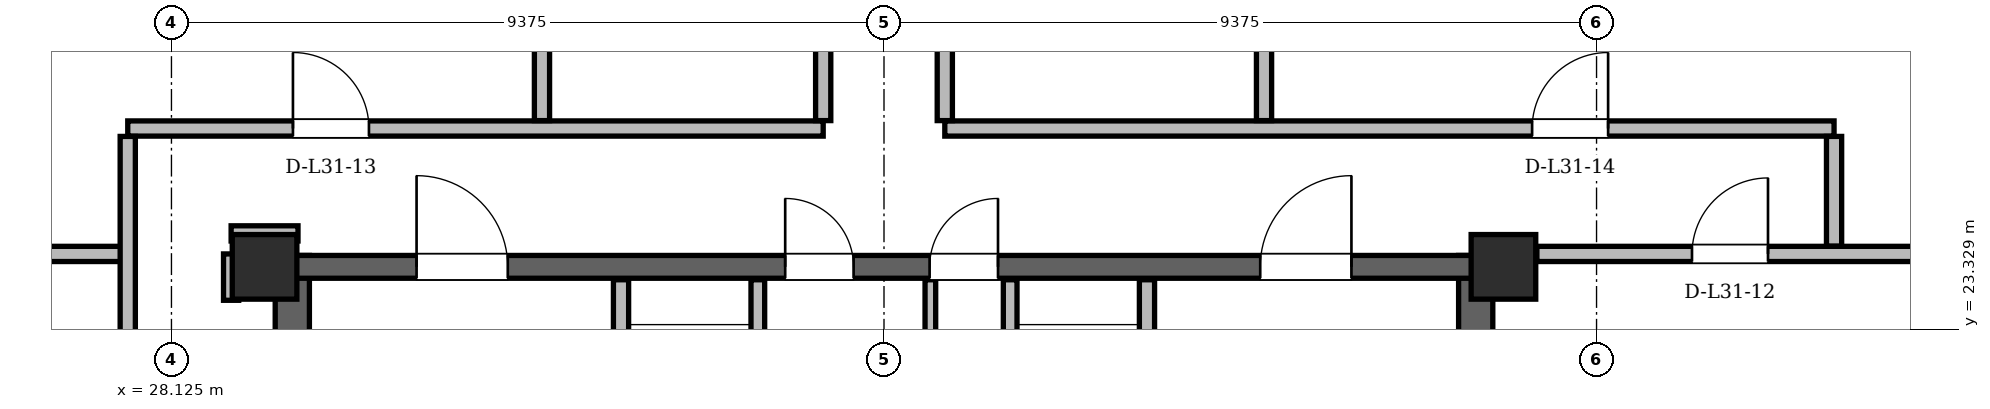
"""IFC4 building model, lengths in metres.
Left out: names, types, materials, properties, quantities, classifications, styles, units other than length and angle.
Written with IfcOpenShell. Run it as: python <this file> out.ifc"""

import sys

from ifc_helpers import new_model, si_unit, direction, frame, frame_2d, origin, origin_2d, place, context, subcontext, project, spatial, rectangle, hollow_rectangle, extrude, element, fill, save


model = new_model("IFC4")
c1 = context("Model", 3, precision=1e-05, world=origin(), true_north=direction((0.0, 1.0)))
c2 = subcontext(c1, "Body", "Model", "MODEL_VIEW")
j1 = project(units=[si_unit("LENGTHUNIT", "METRE"), si_unit("PLANEANGLEUNIT", "RADIAN")], contexts=[c1])
p1 = place(None, origin())
s1 = spatial("IfcSite", under=j1, at=p1, CompositionType="ELEMENT")
p2 = place(p1, origin())
s2 = spatial("IfcBuilding", under=s1, at=p2, CompositionType="ELEMENT")
p3 = place(p2, frame((0.0, 0.0, 119.4)))
s3 = spatial("IfcBuildingStorey", under=s2, at=p3, CompositionType="ELEMENT", Elevation=119.4)
for number, where, z_axis, x_axis in (
    (1, (45.65, 24.15, 0.0), (0.0, 0.0, 1.0), (1.0, 0.0, 0.0)),
    (2, (29.35, 24.15, 0.0), (0.0, 0.0, 1.0), (1.0, 0.0, 0.0)),
):
    element("IfcColumn", number, at=place(p3, frame(where, z_axis=z_axis, x_axis=x_axis)), inside=s3, PredefinedType="COLUMN", context=c2, shape_type="SweptSolid", body=[
        extrude(hollow_rectangle(XDim=0.85, YDim=0.85, WallThickness=0.07, at=origin_2d()), origin(), (0.0, 0.0, 1.0), 3.6),
    ])
for number, where, z_axis, x_axis in (
    (3, (29.715, 11.0, 0.0), (0.0, 0.0, 1.0), (0.0, 1.0, 0.0)),
    (4, (45.285, 11.0, 0.0), (0.0, 0.0, 1.0), (0.0, 1.0, 0.0)),
):
    element("IfcWall", number, at=place(p3, frame(where, z_axis=z_axis, x_axis=x_axis)), inside=s3, PredefinedType="SHEAR", context=c2, shape_type="SweptSolid", body=[
        extrude(rectangle(XDim=13.3, YDim=0.45, at=frame_2d((6.65, 0.0))), origin(), (0.0, 0.0, 1.0), 3.36),
    ])
p4 = place(p3, frame((29.65, 24.15, 0.0), z_axis=(0.0, 0.0, 1.0), x_axis=(1.0, 0.0, 0.0)))
e5 = element("IfcWall", 5, at=p4, inside=s3, PredefinedType="SHEAR", context=c2, shape_type="SweptSolid", body=[
    extrude(rectangle(XDim=15.7, YDim=0.3, at=frame_2d((7.85, 0.0))), origin(), (0.0, 0.0, 1.0), 3.36),
])
p5 = place(p4, frame((1.7, 0.0, 0.0)))
e6 = element("IfcOpeningElement", 6, at=p5, cuts=e5, PredefinedType="OPENING", context=c2, shape_type="SweptSolid", body=[
    extrude(rectangle(XDim=1.2, YDim=2.2, at=frame_2d((0.6, 1.1))), frame((0.0, 0.15, 0.0), z_axis=(0.0, -1.0, 0.0), x_axis=(1.0, 0.0, 0.0)), (0.0, 0.0, 1.0), 0.3),
])
p6 = place(p4, frame((12.8, 0.0, 0.0)))
e7 = element("IfcOpeningElement", 7, at=p6, cuts=e5, PredefinedType="OPENING", context=c2, shape_type="SweptSolid", body=[
    extrude(rectangle(XDim=1.2, YDim=2.2, at=frame_2d((0.6, 1.1))), frame((0.0, 0.15, 0.0), z_axis=(0.0, -1.0, 0.0), x_axis=(1.0, 0.0, 0.0)), (0.0, 0.0, 1.0), 0.3),
])
p7 = place(p4, frame((6.55, 0.0, 0.0)))
e8 = element("IfcOpeningElement", 8, at=p7, cuts=e5, PredefinedType="OPENING", context=c2, shape_type="SweptSolid", body=[
    extrude(rectangle(XDim=0.9, YDim=2.05, at=frame_2d((0.45, 1.025))), frame((0.0, 0.15, 0.0), z_axis=(0.0, -1.0, 0.0), x_axis=(1.0, 0.0, 0.0)), (0.0, 0.0, 1.0), 0.3),
])
p8 = place(p4, frame((8.45, 0.0, 0.0)))
e9 = element("IfcOpeningElement", 9, at=p8, cuts=e5, PredefinedType="OPENING", context=c2, shape_type="SweptSolid", body=[
    extrude(rectangle(XDim=0.9, YDim=2.05, at=frame_2d((0.45, 1.025))), frame((0.0, 0.15, 0.0), z_axis=(0.0, -1.0, 0.0), x_axis=(1.0, 0.0, 0.0)), (0.0, 0.0, 1.0), 0.3),
])
p9 = place(p3, frame((60.417, 13.181, 0.0), z_axis=(0.0, 0.0, 1.0), x_axis=(-0.499998569178, 0.866026229868, 0.0)))
e10 = element("IfcWall", 10, at=p9, inside=s3, PredefinedType="SOLIDWALL", context=c2, shape_type="SweptSolid", body=[
    extrude(rectangle(XDim=34.901, YDim=0.34, at=frame_2d((17.451, 0.0))), origin(), (0.0, 0.0, 1.0), 2.578),
])
p10 = place(p9, frame((6.369, 0.0, 0.0)))
e11 = element("IfcOpeningElement", 11, at=p10, cuts=e10, PredefinedType="OPENING", context=c2, shape_type="SweptSolid", body=[
    extrude(rectangle(XDim=1.5, YDim=2.2, at=frame_2d((0.75, 1.1))), frame((0.0, 0.17, 0.0), z_axis=(0.0, -1.0, 0.0), x_axis=(1.0, 0.0, 0.0)), (0.0, 0.0, 1.0), 0.34),
])
p11 = place(p9, frame((25.367, 0.0, 0.0)))
e12 = element("IfcOpeningElement", 12, at=p11, cuts=e10, PredefinedType="OPENING", context=c2, shape_type="SweptSolid", body=[
    extrude(rectangle(XDim=1.5, YDim=2.2, at=frame_2d((0.75, 1.1))), frame((0.0, 0.17, 0.0), z_axis=(0.0, -1.0, 0.0), x_axis=(1.0, 0.0, 0.0)), (0.0, 0.0, 1.0), 0.34),
])
p12 = place(p9, frame((3.309, 0.0, 0.85)))
e13 = element("IfcOpeningElement", 13, at=p12, cuts=e10, PredefinedType="OPENING", context=c2, shape_type="SweptSolid", body=[
    extrude(rectangle(XDim=1.2, YDim=1.48, at=frame_2d((0.6, 0.74))), frame((0.0, 0.17, 0.0), z_axis=(0.0, -1.0, 0.0), x_axis=(1.0, 0.0, 0.0)), (0.0, 0.0, 1.0), 0.34),
])
p13 = place(p9, frame((11.346, 0.0, 0.85)))
e14 = element("IfcOpeningElement", 14, at=p13, cuts=e10, PredefinedType="OPENING", context=c2, shape_type="SweptSolid", body=[
    extrude(rectangle(XDim=1.2, YDim=1.48, at=frame_2d((0.6, 0.74))), frame((0.0, 0.17, 0.0), z_axis=(0.0, -1.0, 0.0), x_axis=(1.0, 0.0, 0.0)), (0.0, 0.0, 1.0), 0.34),
])
p14 = place(p9, frame((32.719, 0.0, 0.85)))
e15 = element("IfcOpeningElement", 15, at=p14, cuts=e10, PredefinedType="OPENING", context=c2, shape_type="SweptSolid", body=[
    extrude(rectangle(XDim=1.2, YDim=1.48, at=frame_2d((0.6, 0.74))), frame((0.0, 0.17, 0.0), z_axis=(0.0, -1.0, 0.0), x_axis=(1.0, 0.0, 0.0)), (0.0, 0.0, 1.0), 0.34),
])
p15 = place(p9, frame((14.549, 0.0, 0.85)))
e16 = element("IfcOpeningElement", 16, at=p15, cuts=e10, PredefinedType="OPENING", context=c2, shape_type="SweptSolid", body=[
    extrude(rectangle(XDim=2.5, YDim=1.618, at=frame_2d((1.25, 0.809))), frame((0.0, 0.17, 0.0), z_axis=(0.0, -1.0, 0.0), x_axis=(1.0, 0.0, 0.0)), (0.0, 0.0, 1.0), 0.34),
])
p16 = place(p9, frame((20.967, 0.0, 0.85)))
e17 = element("IfcOpeningElement", 17, at=p16, cuts=e10, PredefinedType="OPENING", context=c2, shape_type="SweptSolid", body=[
    extrude(rectangle(XDim=2.4, YDim=1.618, at=frame_2d((1.2, 0.809))), frame((0.0, 0.17, 0.0), z_axis=(0.0, -1.0, 0.0), x_axis=(1.0, 0.0, 0.0)), (0.0, 0.0, 1.0), 0.34),
])
p17 = place(p9, frame((30.927, 0.0, 0.85)))
e18 = element("IfcOpeningElement", 18, at=p17, cuts=e10, PredefinedType="OPENING", context=c2, shape_type="SweptSolid", body=[
    extrude(rectangle(XDim=1.2, YDim=1.48, at=frame_2d((0.6, 0.74))), frame((0.0, 0.17, 0.0), z_axis=(0.0, -1.0, 0.0), x_axis=(1.0, 0.0, 0.0)), (0.0, 0.0, 1.0), 0.34),
])
p18 = place(p3, frame((32.034, 43.406, 0.0), z_axis=(0.0, 0.0, 1.0), x_axis=(-0.499998569178, -0.866026229868, 0.0)))
e19 = element("IfcWall", 19, at=p18, inside=s3, PredefinedType="SOLIDWALL", context=c2, shape_type="SweptSolid", body=[
    extrude(rectangle(XDim=34.901, YDim=0.34, at=frame_2d((17.451, 0.0))), origin(), (0.0, 0.0, 1.0), 2.578),
])
p19 = place(p18, frame((6.469, 0.0, 0.0)))
e20 = element("IfcOpeningElement", 20, at=p19, cuts=e19, PredefinedType="OPENING", context=c2, shape_type="SweptSolid", body=[
    extrude(rectangle(XDim=1.3, YDim=2.2, at=frame_2d((0.65, 1.1))), frame((0.0, 0.17, 0.0), z_axis=(0.0, -1.0, 0.0), x_axis=(1.0, 0.0, 0.0)), (0.0, 0.0, 1.0), 0.34),
])
p20 = place(p18, frame((25.997, 0.0, 0.0)))
e21 = element("IfcOpeningElement", 21, at=p20, cuts=e19, PredefinedType="OPENING", context=c2, shape_type="SweptSolid", body=[
    extrude(rectangle(XDim=1.5, YDim=2.2, at=frame_2d((0.75, 1.1))), frame((0.0, 0.17, 0.0), z_axis=(0.0, -1.0, 0.0), x_axis=(1.0, 0.0, 0.0)), (0.0, 0.0, 1.0), 0.34),
])
p21 = place(p18, frame((12.195, 0.0, 0.85)))
e22 = element("IfcOpeningElement", 22, at=p21, cuts=e19, PredefinedType="OPENING", context=c2, shape_type="SweptSolid", body=[
    extrude(rectangle(XDim=1.8, YDim=1.618, at=frame_2d((0.9, 0.809))), frame((0.0, 0.17, 0.0), z_axis=(0.0, -1.0, 0.0), x_axis=(1.0, 0.0, 0.0)), (0.0, 0.0, 1.0), 0.34),
])
p22 = place(p18, frame((18.557, 0.0, 0.85)))
e23 = element("IfcOpeningElement", 23, at=p22, cuts=e19, PredefinedType="OPENING", context=c2, shape_type="SweptSolid", body=[
    extrude(rectangle(XDim=1.2, YDim=1.48, at=frame_2d((0.6, 0.74))), frame((0.0, 0.17, 0.0), z_axis=(0.0, -1.0, 0.0), x_axis=(1.0, 0.0, 0.0)), (0.0, 0.0, 1.0), 0.34),
])
p23 = place(p18, frame((3.108, 0.0, 0.85)))
e24 = element("IfcOpeningElement", 24, at=p23, cuts=e19, PredefinedType="OPENING", context=c2, shape_type="SweptSolid", body=[
    extrude(rectangle(XDim=1.2, YDim=1.48, at=frame_2d((0.6, 0.74))), frame((0.0, 0.17, 0.0), z_axis=(0.0, -1.0, 0.0), x_axis=(1.0, 0.0, 0.0)), (0.0, 0.0, 1.0), 0.34),
])
p24 = place(p18, frame((30.626, 0.0, 0.85)))
e25 = element("IfcOpeningElement", 25, at=p24, cuts=e19, PredefinedType="OPENING", context=c2, shape_type="SweptSolid", body=[
    extrude(rectangle(XDim=1.2, YDim=1.48, at=frame_2d((0.6, 0.74))), frame((0.0, 0.17, 0.0), z_axis=(0.0, -1.0, 0.0), x_axis=(1.0, 0.0, 0.0)), (0.0, 0.0, 1.0), 0.34),
])
p25 = place(p3, frame((34.04, 19.48, 0.0), z_axis=(0.0, 0.0, 1.0), x_axis=(0.0, 1.0, 0.0)))
e26 = element("IfcWall", 26, at=p25, inside=s3, PredefinedType="PARTITIONING", context=c2, shape_type="SweptSolid", body=[
    extrude(rectangle(XDim=4.5, YDim=0.2, at=frame_2d((2.25, 0.0))), origin(), (0.0, 0.0, 1.0), 2.4),
])
p26 = place(p25, frame((2.12, 0.0, 0.0)))
e27 = element("IfcOpeningElement", 27, at=p26, cuts=e26, PredefinedType="OPENING", context=c2, shape_type="SweptSolid", body=[
    extrude(rectangle(XDim=1.1, YDim=2.2, at=frame_2d((0.55, 1.1))), frame((0.0, 0.1, 0.0), z_axis=(0.0, -1.0, 0.0), x_axis=(1.0, 0.0, 0.0)), (0.0, 0.0, 1.0), 0.2),
])
p27 = place(p3, frame((35.84, 20.96, 0.0), z_axis=(0.0, 0.0, 1.0), x_axis=(0.0, 1.0, 0.0)))
e28 = element("IfcWall", 28, at=p27, inside=s3, PredefinedType="PARTITIONING", context=c2, shape_type="SweptSolid", body=[
    extrude(rectangle(XDim=3.02, YDim=0.18, at=frame_2d((1.51, 0.0))), origin(), (0.0, 0.0, 1.0), 2.4),
])
p28 = place(p3, frame((40.96, 19.48, 0.0), z_axis=(0.0, 0.0, 1.0), x_axis=(0.0, 1.0, 0.0)))
e29 = element("IfcWall", 29, at=p28, inside=s3, PredefinedType="PARTITIONING", context=c2, shape_type="SweptSolid", body=[
    extrude(rectangle(XDim=4.5, YDim=0.2, at=frame_2d((2.25, 0.0))), origin(), (0.0, 0.0, 1.0), 2.4),
])
p29 = place(p28, frame((2.12, 0.0, 0.0)))
e30 = element("IfcOpeningElement", 30, at=p29, cuts=e29, PredefinedType="OPENING", context=c2, shape_type="SweptSolid", body=[
    extrude(rectangle(XDim=1.1, YDim=2.2, at=frame_2d((0.55, 1.1))), frame((0.0, 0.1, 0.0), z_axis=(0.0, -1.0, 0.0), x_axis=(1.0, 0.0, 0.0)), (0.0, 0.0, 1.0), 0.2),
])
p30 = place(p3, frame((39.16, 20.96, 0.0), z_axis=(0.0, 0.0, 1.0), x_axis=(0.0, 1.0, 0.0)))
e31 = element("IfcWall", 31, at=p30, inside=s3, PredefinedType="PARTITIONING", context=c2, shape_type="SweptSolid", body=[
    extrude(rectangle(XDim=3.02, YDim=0.18, at=frame_2d((1.51, 0.0))), origin(), (0.0, 0.0, 1.0), 2.4),
])
p31 = place(p3, frame((38.11, 21.06, 0.0), z_axis=(0.0, 0.0, 1.0), x_axis=(0.0, 1.0, 0.0)))
e32 = element("IfcWall", 32, at=p31, inside=s3, PredefinedType="PARTITIONING", context=c2, shape_type="SweptSolid", body=[
    extrude(rectangle(XDim=2.92, YDim=0.14, at=frame_2d((1.46, 0.0))), origin(), (0.0, 0.0, 1.0), 2.4),
])
p32 = place(p3, frame((21.215, 24.32, 0.0), z_axis=(0.0, 0.0, 1.0), x_axis=(1.0, 0.0, 0.0)))
e33 = element("IfcWall", 33, at=p32, inside=s3, PredefinedType="PARTITIONING", context=c2, shape_type="SweptSolid", body=[
    extrude(rectangle(XDim=6.335, YDim=0.2, at=frame_2d((3.167, 0.0))), origin(), (0.0, 0.0, 1.0), 3.36),
])
p33 = place(p3, frame((46.09, 24.32, 0.0), z_axis=(0.0, 0.0, 1.0), x_axis=(1.0, 0.0, 0.0)))
e34 = element("IfcWall", 34, at=p33, inside=s3, PredefinedType="PARTITIONING", context=c2, shape_type="SweptSolid", body=[
    extrude(rectangle(XDim=7.695, YDim=0.2, at=frame_2d((3.847, 0.0))), origin(), (0.0, 0.0, 1.0), 2.946),
])
p34 = place(p33, frame((2.041, 0.0, 0.0)))
e35 = element("IfcOpeningElement", 35, at=p34, cuts=e34, PredefinedType="OPENING", context=c2, shape_type="SweptSolid", body=[
    extrude(rectangle(XDim=1.0, YDim=2.18, at=frame_2d((0.5, 1.09))), frame((0.0, 0.1, 0.0), z_axis=(0.0, -1.0, 0.0), x_axis=(1.0, 0.0, 0.0)), (0.0, 0.0, 1.0), 0.2),
])
p35 = place(p3, frame((28.91, 24.59, 0.0), z_axis=(0.0, 0.0, 1.0), x_axis=(1.0, 0.0, 0.0)))
e36 = element("IfcWall", 36, at=p35, inside=s3, PredefinedType="PARTITIONING", context=c2, shape_type="SweptSolid", body=[
    extrude(rectangle(XDim=0.88, YDim=0.2, at=frame_2d((0.44, 0.0))), origin(), (0.0, 0.0, 1.0), 2.814),
])
p36 = place(p3, frame((27.55, 25.97, 0.0), z_axis=(0.0, 0.0, 1.0), x_axis=(1.0, 0.0, 0.0)))
e37 = element("IfcWall", 37, at=p36, inside=s3, PredefinedType="PARTITIONING", context=c2, shape_type="SweptSolid", body=[
    extrude(rectangle(XDim=9.15, YDim=0.2, at=frame_2d((4.575, 0.0))), origin(), (0.0, 0.0, 1.0), 2.814),
])
p37 = place(p36, frame((2.173, 0.0, 0.0)))
e38 = element("IfcOpeningElement", 38, at=p37, cuts=e37, PredefinedType="OPENING", context=c2, shape_type="SweptSolid", body=[
    extrude(rectangle(XDim=1.0, YDim=2.18, at=frame_2d((0.5, 1.09))), frame((0.0, 0.1, 0.0), z_axis=(0.0, -1.0, 0.0), x_axis=(1.0, 0.0, 0.0)), (0.0, 0.0, 1.0), 0.2),
])
p38 = place(p3, frame((38.3, 25.97, 0.0), z_axis=(0.0, 0.0, 1.0), x_axis=(1.0, 0.0, 0.0)))
e39 = element("IfcWall", 39, at=p38, inside=s3, PredefinedType="PARTITIONING", context=c2, shape_type="SweptSolid", body=[
    extrude(rectangle(XDim=11.7, YDim=0.2, at=frame_2d((5.85, 0.0))), origin(), (0.0, 0.0, 1.0), 2.814),
])
p39 = place(p38, frame((7.727, 0.0, 0.0)))
e40 = element("IfcOpeningElement", 40, at=p39, cuts=e39, PredefinedType="OPENING", context=c2, shape_type="SweptSolid", body=[
    extrude(rectangle(XDim=1.0, YDim=2.18, at=frame_2d((0.5, 1.09))), frame((0.0, 0.1, 0.0), z_axis=(0.0, -1.0, 0.0), x_axis=(1.0, 0.0, 0.0)), (0.0, 0.0, 1.0), 0.2),
])
p40 = place(p3, frame((27.55, 18.554, 0.0), z_axis=(0.0, 0.0, 1.0), x_axis=(0.0, 1.0, 0.0)))
e41 = element("IfcWall", 41, at=p40, inside=s3, PredefinedType="PARTITIONING", context=c2, shape_type="SweptSolid", body=[
    extrude(rectangle(XDim=7.312, YDim=0.2, at=frame_2d((3.656, 0.0))), origin(), (0.0, 0.0, 1.0), 3.36),
])
p41 = place(p3, frame((28.91, 23.71, 0.0), z_axis=(0.0, 0.0, 1.0), x_axis=(0.0, 1.0, 0.0)))
e42 = element("IfcWall", 42, at=p41, inside=s3, PredefinedType="PARTITIONING", context=c2, shape_type="SweptSolid", body=[
    extrude(rectangle(XDim=0.61, YDim=0.2, at=frame_2d((0.305, 0.0))), origin(), (0.0, 0.0, 1.0), 3.36),
])
p42 = place(p3, frame((33.0, 26.074, 0.0), z_axis=(0.0, 0.0, 1.0), x_axis=(0.0, 1.0, 0.0)))
e43 = element("IfcWall", 43, at=p42, inside=s3, PredefinedType="PARTITIONING", context=c2, shape_type="SweptSolid", body=[
    extrude(rectangle(XDim=17.158, YDim=0.2, at=frame_2d((8.579, 0.0))), origin(), (0.0, 0.0, 1.0), 3.36),
])
p43 = place(p3, frame((36.7, 26.074, 0.0), z_axis=(0.0, 0.0, 1.0), x_axis=(0.0, 1.0, 0.0)))
e44 = element("IfcWall", 44, at=p43, inside=s3, PredefinedType="PARTITIONING", context=c2, shape_type="SweptSolid", body=[
    extrude(rectangle(XDim=17.158, YDim=0.2, at=frame_2d((8.579, 0.0))), origin(), (0.0, 0.0, 1.0), 3.36),
])
p44 = place(p43, frame((8.536, 0.0, 0.0)))
e45 = element("IfcOpeningElement", 45, at=p44, cuts=e44, PredefinedType="OPENING", context=c2, shape_type="SweptSolid", body=[
    extrude(rectangle(XDim=1.0, YDim=2.18, at=frame_2d((0.5, 1.09))), frame((0.0, 0.1, 0.0), z_axis=(0.0, -1.0, 0.0), x_axis=(1.0, 0.0, 0.0)), (0.0, 0.0, 1.0), 0.2),
])
p45 = place(p3, frame((38.3, 26.074, 0.0), z_axis=(0.0, 0.0, 1.0), x_axis=(0.0, 1.0, 0.0)))
e46 = element("IfcWall", 46, at=p45, inside=s3, PredefinedType="PARTITIONING", context=c2, shape_type="SweptSolid", body=[
    extrude(rectangle(XDim=13.422, YDim=0.2, at=frame_2d((6.711, 0.0))), origin(), (0.0, 0.0, 1.0), 3.36),
])
p46 = place(p45, frame((8.536, 0.0, 0.0)))
e47 = element("IfcOpeningElement", 47, at=p46, cuts=e46, PredefinedType="OPENING", context=c2, shape_type="SweptSolid", body=[
    extrude(rectangle(XDim=1.0, YDim=2.18, at=frame_2d((0.5, 1.09))), frame((0.0, 0.1, 0.0), z_axis=(0.0, -1.0, 0.0), x_axis=(1.0, 0.0, 0.0)), (0.0, 0.0, 1.0), 0.2),
])
p47 = place(p3, frame((42.5, 26.074, 0.0), z_axis=(0.0, 0.0, 1.0), x_axis=(0.0, 1.0, 0.0)))
e48 = element("IfcWall", 48, at=p47, inside=s3, PredefinedType="PARTITIONING", context=c2, shape_type="SweptSolid", body=[
    extrude(rectangle(XDim=17.158, YDim=0.2, at=frame_2d((8.579, 0.0))), origin(), (0.0, 0.0, 1.0), 3.36),
])
p48 = place(p3, frame((50.0, 24.424, 0.0), z_axis=(0.0, 0.0, 1.0), x_axis=(0.0, 1.0, 0.0)))
e49 = element("IfcWall", 49, at=p48, inside=s3, PredefinedType="PARTITIONING", context=c2, shape_type="SweptSolid", body=[
    extrude(rectangle(XDim=1.442, YDim=0.2, at=frame_2d((0.721, 0.0))), origin(), (0.0, 0.0, 1.0), 3.36),
])
p49 = place(p5, origin())
e50 = element("IfcDoor", 50, at=p49, inside=s3, OperationType="SINGLE_SWING_LEFT", PredefinedType="DOOR", context=c2, shape_type="SweptSolid", body=[
    extrude(rectangle(XDim=1.2, YDim=2.2, at=frame_2d((0.6, 1.1))), frame((0.0, 0.025, 0.0), z_axis=(0.0, -1.0, 0.0), x_axis=(1.0, 0.0, 0.0)), (0.0, 0.0, 1.0), 0.05),
])
fill(e6, e50)
p50 = place(p6, origin())
e51 = element("IfcDoor", 51, at=p50, inside=s3, OperationType="SINGLE_SWING_RIGHT", PredefinedType="DOOR", context=c2, shape_type="SweptSolid", body=[
    extrude(rectangle(XDim=1.2, YDim=2.2, at=frame_2d((0.6, 1.1))), frame((0.0, 0.025, 0.0), z_axis=(0.0, -1.0, 0.0), x_axis=(1.0, 0.0, 0.0)), (0.0, 0.0, 1.0), 0.05),
])
fill(e7, e51)
p51 = place(p7, origin())
e52 = element("IfcDoor", 52, at=p51, inside=s3, OperationType="SINGLE_SWING_LEFT", PredefinedType="DOOR", context=c2, shape_type="SweptSolid", body=[
    extrude(rectangle(XDim=0.9, YDim=2.05, at=frame_2d((0.45, 1.025))), frame((0.0, 0.025, 0.0), z_axis=(0.0, -1.0, 0.0), x_axis=(1.0, 0.0, 0.0)), (0.0, 0.0, 1.0), 0.05),
])
fill(e8, e52)
p52 = place(p8, origin())
e53 = element("IfcDoor", 53, at=p52, inside=s3, OperationType="SINGLE_SWING_RIGHT", PredefinedType="DOOR", context=c2, shape_type="SweptSolid", body=[
    extrude(rectangle(XDim=0.9, YDim=2.05, at=frame_2d((0.45, 1.025))), frame((0.0, 0.025, 0.0), z_axis=(0.0, -1.0, 0.0), x_axis=(1.0, 0.0, 0.0)), (0.0, 0.0, 1.0), 0.05),
])
fill(e9, e53)
p53 = place(p34, origin())
e54 = element("IfcDoor", 54, at=p53, inside=s3, OperationType="SINGLE_SWING_RIGHT", PredefinedType="DOOR", context=c2, shape_type="SweptSolid", body=[
    extrude(rectangle(XDim=1.0, YDim=2.18, at=frame_2d((0.5, 1.09))), frame((0.0, 0.025, 0.0), z_axis=(0.0, -1.0, 0.0), x_axis=(1.0, 0.0, 0.0)), (0.0, 0.0, 1.0), 0.05),
])
fill(e35, e54)
p54 = place(p37, origin())
e55 = element("IfcDoor", 55, at=p54, inside=s3, OperationType="SINGLE_SWING_LEFT", PredefinedType="DOOR", context=c2, shape_type="SweptSolid", body=[
    extrude(rectangle(XDim=1.0, YDim=2.18, at=frame_2d((0.5, 1.09))), frame((0.0, 0.025, 0.0), z_axis=(0.0, -1.0, 0.0), x_axis=(1.0, 0.0, 0.0)), (0.0, 0.0, 1.0), 0.05),
])
fill(e38, e55)
p55 = place(p39, origin())
e56 = element("IfcDoor", 56, at=p55, inside=s3, OperationType="SINGLE_SWING_RIGHT", PredefinedType="DOOR", context=c2, shape_type="SweptSolid", body=[
    extrude(rectangle(XDim=1.0, YDim=2.18, at=frame_2d((0.5, 1.09))), frame((0.0, 0.025, 0.0), z_axis=(0.0, -1.0, 0.0), x_axis=(1.0, 0.0, 0.0)), (0.0, 0.0, 1.0), 0.05),
])
fill(e40, e56)
save(model, sys.argv[1])
